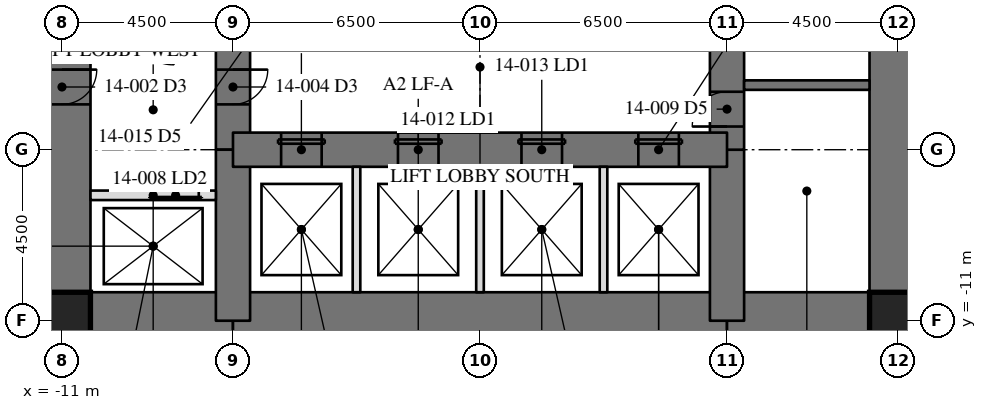
"""IFC4 building model, lengths in metres.
Left out: names, types, materials, properties, quantities, classifications, styles, units other than length and angle.
Written with IfcOpenShell. Run it as: python <this file> out.ifc"""

import sys

from ifc_helpers import new_model, si_unit, direction, frame, frame_2d, origin, origin_2d, place, context, subcontext, project, spatial, rectangle, hollow_rectangle, extrude, element, fill, save


model = new_model("IFC4")
c1 = context("Model", 3, precision=1e-05, world=origin(), true_north=direction((0.0, 1.0)))
c2 = subcontext(c1, "Body", "Model", "MODEL_VIEW")
j1 = project(units=[si_unit("LENGTHUNIT", "METRE"), si_unit("PLANEANGLEUNIT", "RADIAN")], contexts=[c1])
p1 = place(None, origin())
s1 = spatial("IfcSite", under=j1, at=p1, CompositionType="ELEMENT")
p2 = place(p1, origin())
s2 = spatial("IfcBuilding", under=s1, at=p2, CompositionType="ELEMENT")
p3 = place(p2, frame((0.0, 0.0, 61.1)))
s3 = spatial("IfcBuildingStorey", under=s2, at=p3, CompositionType="ELEMENT", Elevation=61.1)
p4 = place(p3, frame((11.0, -11.0, 0.0), z_axis=(0.0, 0.0, 1.0), x_axis=(0.0, 1.0, 0.0)))
e1 = element("IfcWall", 1, at=p4, inside=s3, PredefinedType="SHEAR", context=c2, shape_type="SweptSolid", body=[
    extrude(rectangle(XDim=22.0, YDim=1.5, at=frame_2d((11.0, 0.0))), origin(), (0.0, 0.0, 1.0), 4.1),
])
p5 = place(p4, frame((15.393, 0.0, 0.0)))
e2 = element("IfcOpeningElement", 2, at=p5, cuts=e1, PredefinedType="OPENING", context=c2, shape_type="SweptSolid", body=[
    extrude(rectangle(XDim=0.915, YDim=2.134, at=frame_2d((0.458, 1.067))), frame((0.0, 0.76, 0.0), z_axis=(0.0, -1.0, 0.0), x_axis=(1.0, 0.0, 0.0)), (0.0, 0.0, 1.0), 1.52),
])
p6 = place(p3, frame((-11.0, 11.0, 0.0), z_axis=(0.0, 0.0, 1.0), x_axis=(0.0, -1.0, 0.0)))
e3 = element("IfcWall", 3, at=p6, inside=s3, PredefinedType="SHEAR", context=c2, shape_type="SweptSolid", body=[
    extrude(rectangle(XDim=22.0, YDim=1.5, at=frame_2d((11.0, 0.0))), origin(), (0.0, 0.0, 1.0), 4.1),
])
p7 = place(p6, frame((15.393, 0.0, 0.0)))
e4 = element("IfcOpeningElement", 4, at=p7, cuts=e3, PredefinedType="OPENING", context=c2, shape_type="SweptSolid", body=[
    extrude(rectangle(XDim=0.915, YDim=2.134, at=frame_2d((0.458, 1.067))), frame((0.0, 0.76, 0.0), z_axis=(0.0, -1.0, 0.0), x_axis=(1.0, 0.0, 0.0)), (0.0, 0.0, 1.0), 1.52),
])
p8 = place(p3, frame((-11.0, -11.0, 0.0), z_axis=(0.0, 0.0, 1.0), x_axis=(1.0, 0.0, 0.0)))
e5 = element("IfcWall", 5, at=p8, inside=s3, PredefinedType="SHEAR", context=c2, shape_type="SweptSolid", body=[
    extrude(rectangle(XDim=4.5, YDim=1.5, at=frame_2d((2.25, 0.0))), origin(), (0.0, 0.0, 1.0), 4.1),
])
p9 = place(p3, frame((-6.5, -11.0, 0.0), z_axis=(0.0, 0.0, 1.0), x_axis=(1.0, 0.0, 0.0)))
e6 = element("IfcWall", 6, at=p9, inside=s3, PredefinedType="SHEAR", context=c2, shape_type="SweptSolid", body=[
    extrude(rectangle(XDim=13.0, YDim=1.5, at=frame_2d((6.5, 0.0))), origin(), (0.0, 0.0, 1.0), 4.1),
])
p10 = place(p3, frame((6.5, -11.0, 0.0), z_axis=(0.0, 0.0, 1.0), x_axis=(1.0, 0.0, 0.0)))
e7 = element("IfcWall", 7, at=p10, inside=s3, PredefinedType="SHEAR", context=c2, shape_type="SweptSolid", body=[
    extrude(rectangle(XDim=4.5, YDim=1.5, at=frame_2d((2.25, 0.0))), origin(), (0.0, 0.0, 1.0), 4.1),
])
p11 = place(p3, frame((6.5, -11.0, 0.0), z_axis=(0.0, 0.0, 1.0), x_axis=(0.0, 1.0, 0.0)))
e8 = element("IfcWall", 8, at=p11, inside=s3, PredefinedType="SHEAR", context=c2, shape_type="SweptSolid", body=[
    extrude(rectangle(XDim=4.5, YDim=0.9, at=frame_2d((2.25, 0.0))), origin(), (0.0, 0.0, 1.0), 4.1),
])
p12 = place(p3, frame((6.5, -6.5, 0.0), z_axis=(0.0, 0.0, 1.0), x_axis=(0.0, 1.0, 0.0)))
e9 = element("IfcWall", 9, at=p12, inside=s3, PredefinedType="SHEAR", context=c2, shape_type="SweptSolid", body=[
    extrude(rectangle(XDim=13.0, YDim=0.9, at=frame_2d((6.5, 0.0))), origin(), (0.0, 0.0, 1.0), 4.1),
])
p13 = place(p12, frame((10.893, 0.0, 0.0)))
e10 = element("IfcOpeningElement", 10, at=p13, cuts=e9, PredefinedType="OPENING", context=c2, shape_type="SweptSolid", body=[
    extrude(rectangle(XDim=0.915, YDim=2.134, at=frame_2d((0.458, 1.067))), frame((0.0, 0.46, 0.0), z_axis=(0.0, -1.0, 0.0), x_axis=(1.0, 0.0, 0.0)), (0.0, 0.0, 1.0), 0.92),
])
p14 = place(p12, frame((0.61, 0.0, 0.0)))
e11 = element("IfcOpeningElement", 11, at=p14, cuts=e9, PredefinedType="OPENING", context=c2, shape_type="SweptSolid", body=[
    extrude(rectangle(XDim=0.915, YDim=2.134, at=frame_2d((0.458, 1.067))), frame((0.0, 0.46, 0.0), z_axis=(0.0, -1.0, 0.0), x_axis=(1.0, 0.0, 0.0)), (0.0, 0.0, 1.0), 0.92),
])
p15 = place(p3, frame((-6.5, 6.5, 0.0), z_axis=(0.0, 0.0, 1.0), x_axis=(0.0, -1.0, 0.0)))
e12 = element("IfcWall", 12, at=p15, inside=s3, PredefinedType="SHEAR", context=c2, shape_type="SweptSolid", body=[
    extrude(rectangle(XDim=13.0, YDim=0.9, at=frame_2d((6.5, 0.0))), origin(), (0.0, 0.0, 1.0), 4.1),
])
p16 = place(p15, frame((10.893, 0.0, 0.0)))
e13 = element("IfcOpeningElement", 13, at=p16, cuts=e12, PredefinedType="OPENING", context=c2, shape_type="SweptSolid", body=[
    extrude(rectangle(XDim=0.915, YDim=2.134, at=frame_2d((0.458, 1.067))), frame((0.0, 0.46, 0.0), z_axis=(0.0, -1.0, 0.0), x_axis=(1.0, 0.0, 0.0)), (0.0, 0.0, 1.0), 0.92),
])
p17 = place(p15, frame((0.61, 0.0, 0.0)))
e14 = element("IfcOpeningElement", 14, at=p17, cuts=e12, PredefinedType="OPENING", context=c2, shape_type="SweptSolid", body=[
    extrude(rectangle(XDim=0.915, YDim=2.134, at=frame_2d((0.458, 1.067))), frame((0.0, 0.46, 0.0), z_axis=(0.0, -1.0, 0.0), x_axis=(1.0, 0.0, 0.0)), (0.0, 0.0, 1.0), 0.92),
])
p18 = place(p3, frame((-6.5, -6.5, 0.0), z_axis=(0.0, 0.0, 1.0), x_axis=(0.0, -1.0, 0.0)))
e15 = element("IfcWall", 15, at=p18, inside=s3, PredefinedType="SHEAR", context=c2, shape_type="SweptSolid", body=[
    extrude(rectangle(XDim=4.5, YDim=0.9, at=frame_2d((2.25, 0.0))), origin(), (0.0, 0.0, 1.0), 4.1),
])
p19 = place(p3, frame((-6.5, -6.5, 0.0), z_axis=(0.0, 0.0, 1.0), x_axis=(1.0, 0.0, 0.0)))
e16 = element("IfcWall", 16, at=p19, inside=s3, PredefinedType="SHEAR", context=c2, shape_type="SweptSolid", body=[
    extrude(rectangle(XDim=13.0, YDim=0.9, at=frame_2d((6.5, 0.0))), origin(), (0.0, 0.0, 1.0), 4.1),
])
p20 = place(p19, frame((1.267, 0.0, 0.0)))
e17 = element("IfcOpeningElement", 17, at=p20, cuts=e16, PredefinedType="OPENING", context=c2, shape_type="SweptSolid", body=[
    extrude(rectangle(XDim=1.067, YDim=2.134, at=frame_2d((0.533, 1.067))), frame((0.0, 0.46, 0.0), z_axis=(0.0, -1.0, 0.0), x_axis=(1.0, 0.0, 0.0)), (0.0, 0.0, 1.0), 0.92),
])
p21 = place(p19, frame((4.342, 0.0, 0.0)))
e18 = element("IfcOpeningElement", 18, at=p21, cuts=e16, PredefinedType="OPENING", context=c2, shape_type="SweptSolid", body=[
    extrude(rectangle(XDim=1.067, YDim=2.134, at=frame_2d((0.533, 1.067))), frame((0.0, 0.46, 0.0), z_axis=(0.0, -1.0, 0.0), x_axis=(1.0, 0.0, 0.0)), (0.0, 0.0, 1.0), 0.92),
])
p22 = place(p19, frame((7.592, 0.0, 0.0)))
e19 = element("IfcOpeningElement", 19, at=p22, cuts=e16, PredefinedType="OPENING", context=c2, shape_type="SweptSolid", body=[
    extrude(rectangle(XDim=1.067, YDim=2.134, at=frame_2d((0.533, 1.067))), frame((0.0, 0.46, 0.0), z_axis=(0.0, -1.0, 0.0), x_axis=(1.0, 0.0, 0.0)), (0.0, 0.0, 1.0), 0.92),
])
p23 = place(p19, frame((10.667, 0.0, 0.0)))
e20 = element("IfcOpeningElement", 20, at=p23, cuts=e16, PredefinedType="OPENING", context=c2, shape_type="SweptSolid", body=[
    extrude(rectangle(XDim=1.067, YDim=2.134, at=frame_2d((0.533, 1.067))), frame((0.0, 0.46, 0.0), z_axis=(0.0, -1.0, 0.0), x_axis=(1.0, 0.0, 0.0)), (0.0, 0.0, 1.0), 0.92),
])
for number, where, z_axis, x_axis in (
    (21, (-11.0, -11.0, 0.0), (0.0, 0.0, 1.0), (1.0, 0.0, 0.0)),
    (22, (11.0, -11.0, 0.0), (0.0, 0.0, 1.0), (1.0, 0.0, 0.0)),
):
    element("IfcColumn", number, at=place(p3, frame(where, z_axis=z_axis, x_axis=x_axis)), inside=s3, PredefinedType="COLUMN", context=c2, shape_type="SweptSolid", body=[
        extrude(hollow_rectangle(XDim=1.499, YDim=1.499, WallThickness=0.102, at=origin_2d()), origin(), (0.0, 0.0, 1.0), 4.1),
    ])
p24 = place(p3, frame((6.95, -4.8, 0.0), z_axis=(0.0, 0.0, 1.0), x_axis=(1.0, 0.0, 0.0)))
e23 = element("IfcWall", 23, at=p24, inside=s3, PredefinedType="SOLIDWALL", context=c2, shape_type="SweptSolid", body=[
    extrude(rectangle(XDim=3.3, YDim=0.25, at=frame_2d((1.65, 0.0))), origin(), (0.0, 0.0, 1.0), 3.91),
])
p25 = place(p3, frame((-6.95, -7.7, 0.0), z_axis=(0.0, 0.0, 1.0), x_axis=(-1.0, 0.0, 0.0)))
e24 = element("IfcWall", 24, at=p25, inside=s3, PredefinedType="PARTITIONING", context=c2, shape_type="SweptSolid", body=[
    extrude(rectangle(XDim=3.3, YDim=0.25, at=frame_2d((1.65, 0.0))), origin(), (0.0, 0.0, 1.0), 3.91),
])
p26 = place(p25, frame((0.45, 0.0, 0.0)))
e25 = element("IfcOpeningElement", 25, at=p26, cuts=e24, PredefinedType="OPENING", context=c2, shape_type="SweptSolid", body=[
    extrude(rectangle(XDim=1.219, YDim=2.134, at=frame_2d((0.609, 1.067))), frame((0.0, 0.135, 0.0), z_axis=(0.0, -1.0, 0.0), x_axis=(1.0, 0.0, 0.0)), (0.0, 0.0, 1.0), 0.27),
])
for number, where, z_axis, x_axis in (
    (26, (-3.25, -10.25, 0.0), (0.0, 0.0, 1.0), (0.0, 1.0, 0.0)),
    (27, (0.0, -10.25, 0.0), (0.0, 0.0, 1.0), (0.0, 1.0, 0.0)),
    (28, (3.25, -10.25, 0.0), (0.0, 0.0, 1.0), (0.0, 1.0, 0.0)),
):
    element("IfcWall", number, at=place(p3, frame(where, z_axis=z_axis, x_axis=x_axis)), inside=s3, PredefinedType="PARTITIONING", context=c2, shape_type="SweptSolid", body=[
        extrude(rectangle(XDim=3.3, YDim=0.2, at=frame_2d((1.65, 0.0))), origin(), (0.0, 0.0, 1.0), 3.91),
    ])
p27 = place(p16, origin())
e29 = element("IfcDoor", 29, at=p27, inside=s3, OperationType="SINGLE_SWING_RIGHT", PredefinedType="DOOR", context=c2, shape_type="SweptSolid", body=[
    extrude(rectangle(XDim=0.915, YDim=2.134, at=frame_2d((0.458, 1.067))), frame((0.0, -0.375, 0.0), z_axis=(0.0, -1.0, 0.0), x_axis=(1.0, 0.0, 0.0)), (0.0, 0.0, 1.0), 0.05),
])
fill(e13, e29)
p28 = place(p26, origin())
e30 = element("IfcDoor", 30, at=p28, inside=s3, OperationType="SLIDING_TO_LEFT", PredefinedType="DOOR", context=c2, shape_type="SweptSolid", body=[
    extrude(rectangle(XDim=1.219, YDim=2.134, at=frame_2d((0.609, 1.067))), frame((0.0, 0.025, 0.0), z_axis=(0.0, -1.0, 0.0), x_axis=(1.0, 0.0, 0.0)), (0.0, 0.0, 1.0), 0.05),
])
fill(e25, e30)
p29 = place(p14, origin())
e31 = element("IfcDoor", 31, at=p29, inside=s3, OperationType="SINGLE_SWING_RIGHT", PredefinedType="DOOR", context=c2, shape_type="SweptSolid", body=[
    extrude(rectangle(XDim=0.915, YDim=2.134, at=frame_2d((0.458, 1.067))), frame((0.0, -0.375, 0.0), z_axis=(0.0, -1.0, 0.0), x_axis=(1.0, 0.0, 0.0)), (0.0, 0.0, 1.0), 0.05),
])
fill(e11, e31)
p30 = place(p20, origin())
e32 = element("IfcDoor", 32, at=p30, inside=s3, OperationType="SLIDING_TO_LEFT", PredefinedType="DOOR", context=c2, shape_type="SweptSolid", body=[
    extrude(rectangle(XDim=1.067, YDim=2.134, at=frame_2d((0.533, 1.067))), frame((0.0, -0.375, 0.0), z_axis=(0.0, -1.0, 0.0), x_axis=(1.0, 0.0, 0.0)), (0.0, 0.0, 1.0), 0.05),
])
fill(e17, e32)
p31 = place(p21, origin())
e33 = element("IfcDoor", 33, at=p31, inside=s3, OperationType="SLIDING_TO_LEFT", PredefinedType="DOOR", context=c2, shape_type="SweptSolid", body=[
    extrude(rectangle(XDim=1.067, YDim=2.134, at=frame_2d((0.533, 1.067))), frame((0.0, -0.375, 0.0), z_axis=(0.0, -1.0, 0.0), x_axis=(1.0, 0.0, 0.0)), (0.0, 0.0, 1.0), 0.05),
])
fill(e18, e33)
p32 = place(p22, origin())
e34 = element("IfcDoor", 34, at=p32, inside=s3, OperationType="SLIDING_TO_LEFT", PredefinedType="DOOR", context=c2, shape_type="SweptSolid", body=[
    extrude(rectangle(XDim=1.067, YDim=2.134, at=frame_2d((0.533, 1.067))), frame((0.0, -0.375, 0.0), z_axis=(0.0, -1.0, 0.0), x_axis=(1.0, 0.0, 0.0)), (0.0, 0.0, 1.0), 0.05),
])
fill(e19, e34)
p33 = place(p23, origin())
e35 = element("IfcDoor", 35, at=p33, inside=s3, OperationType="SLIDING_TO_LEFT", PredefinedType="DOOR", context=c2, shape_type="SweptSolid", body=[
    extrude(rectangle(XDim=1.067, YDim=2.134, at=frame_2d((0.533, 1.067))), frame((0.0, -0.375, 0.0), z_axis=(0.0, -1.0, 0.0), x_axis=(1.0, 0.0, 0.0)), (0.0, 0.0, 1.0), 0.05),
])
fill(e20, e35)
save(model, sys.argv[1])
